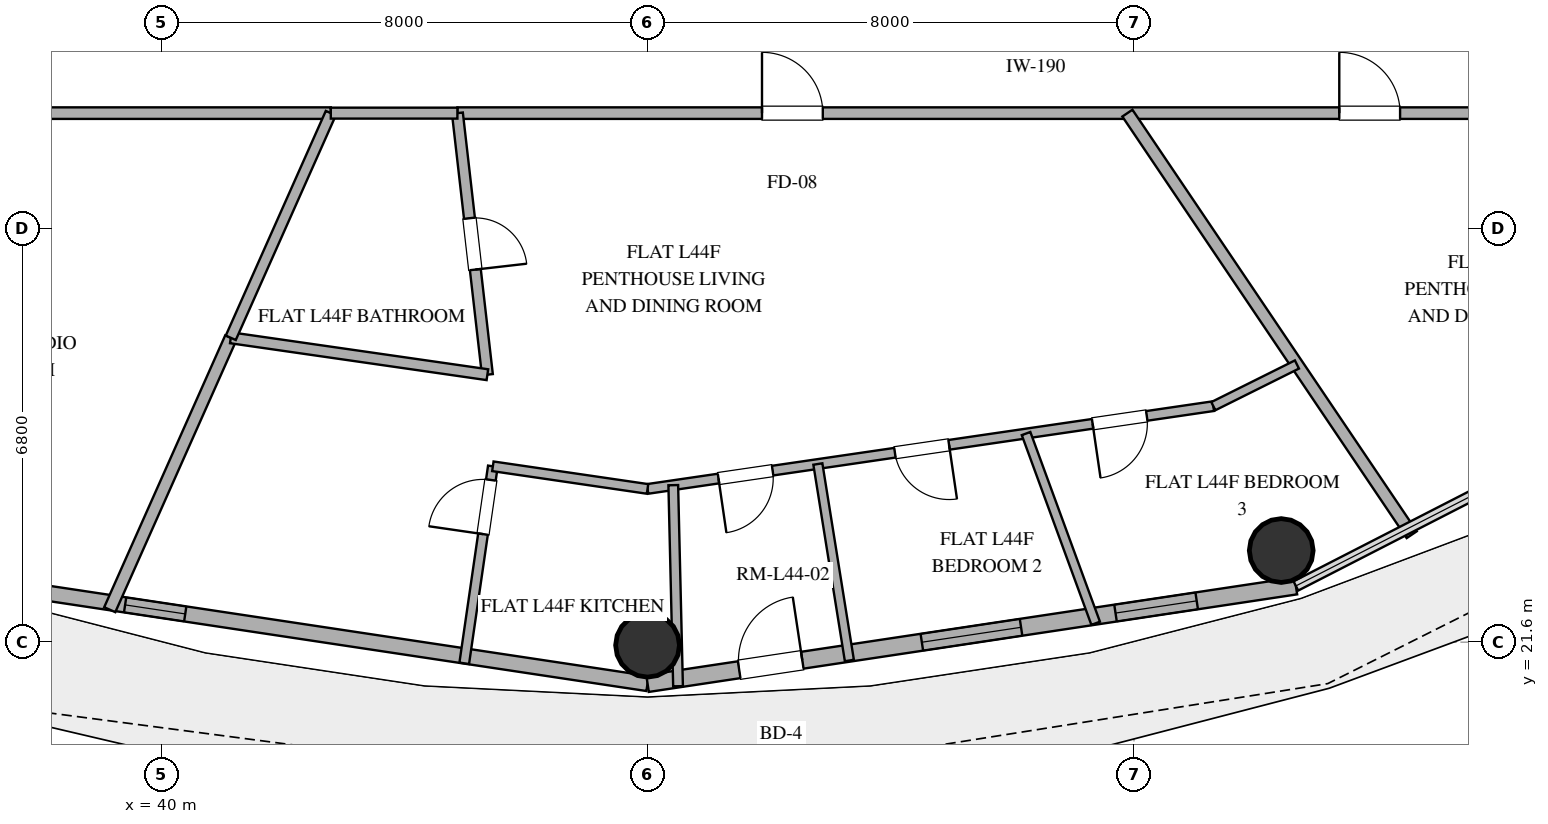
"""IFC4 building model, lengths in metres.
Left out: names, types, materials, properties, quantities, classifications, styles, units other than length and angle.
Written with IfcOpenShell. Run it as: python <this file> out.ifc"""

import sys

from ifc_helpers import new_model, si_unit, direction, frame, frame_2d, origin, origin_2d, place, context, subcontext, project, spatial, rectangle, hollow_circle, extrude, element, fill, save


model = new_model("IFC4")
c1 = context("Model", 3, precision=1e-05, world=origin(), true_north=direction((0.0, 1.0)))
c2 = subcontext(c1, "Body", "Model", "MODEL_VIEW")
j1 = project(units=[si_unit("LENGTHUNIT", "METRE"), si_unit("PLANEANGLEUNIT", "RADIAN")], contexts=[c1])
p1 = place(None, origin())
s1 = spatial("IfcSite", under=j1, at=p1, CompositionType="ELEMENT")
p2 = place(p1, origin())
s2 = spatial("IfcBuilding", under=s1, at=p2, CompositionType="ELEMENT")
p3 = place(p2, frame((0.0, 0.0, 175.8)))
s3 = spatial("IfcBuildingStorey", under=s2, at=p3, CompositionType="ELEMENT", Elevation=175.8)
for number, where, z_axis, x_axis in (
    (1, (48.0, 21.55, 0.0), (0.0, 0.0, 1.0), (1.0, 0.0, 0.0)),
    (2, (58.422, 23.107, 0.0), (0.0, 0.0, 1.0), (1.0, 0.0, 0.0)),
):
    element("IfcColumn", number, at=place(p3, frame(where, z_axis=z_axis, x_axis=x_axis)), inside=s3, PredefinedType="COLUMN", context=c2, shape_type="SweptSolid", body=[
        extrude(hollow_circle(Radius=0.525, WallThickness=0.028, at=origin_2d()), origin(), (0.0, 0.0, 1.0), 3.38),
    ])
p4 = place(p3, frame((37.337, 22.525, 0.0), z_axis=(0.0, 0.0, 1.0), x_axis=(0.988863993413, -0.148822049884, 0.0)))
e3 = element("IfcWall", 3, at=p4, inside=s3, PredefinedType="SOLIDWALL", context=c2, shape_type="SweptSolid", body=[
    extrude(rectangle(XDim=10.783, YDim=0.25, at=frame_2d((5.392, 0.0))), origin(), (0.0, 0.0, 1.0), 3.38),
])
p5 = place(p4, frame((2.094, 0.0, 1.42)))
e4 = element("IfcOpeningElement", 4, at=p5, cuts=e3, PredefinedType="OPENING", context=c2, shape_type="SweptSolid", body=[
    extrude(rectangle(XDim=1.0, YDim=1.05, at=frame_2d((0.5, 0.525))), frame((0.0, 0.135, 0.0), z_axis=(0.0, -1.0, 0.0), x_axis=(1.0, 0.0, 0.0)), (0.0, 0.0, 1.0), 0.27),
])
p6 = place(p3, frame((48.0, 20.92, 0.0), z_axis=(0.0, 0.0, 1.0), x_axis=(0.988863993413, 0.148822049884, 0.0)))
e5 = element("IfcWall", 5, at=p6, inside=s3, PredefinedType="SOLIDWALL", context=c2, shape_type="SweptSolid", body=[
    extrude(rectangle(XDim=10.783, YDim=0.28, at=frame_2d((5.392, 0.0))), origin(), (0.0, 0.0, 1.0), 3.38),
])
p7 = place(p6, frame((1.524, 0.0, 0.0)))
e6 = element("IfcOpeningElement", 6, at=p7, cuts=e5, PredefinedType="OPENING", context=c2, shape_type="SweptSolid", body=[
    extrude(rectangle(XDim=1.05, YDim=2.2, at=frame_2d((0.525, 1.1))), frame((0.0, 0.15, 0.0), z_axis=(0.0, -1.0, 0.0), x_axis=(1.0, 0.0, 0.0)), (0.0, 0.0, 1.0), 0.3),
])
p8 = place(p6, frame((4.562, 0.0, 0.85)))
e7 = element("IfcOpeningElement", 7, at=p8, cuts=e5, PredefinedType="OPENING", context=c2, shape_type="SweptSolid", body=[
    extrude(rectangle(XDim=1.65, YDim=2.0, at=frame_2d((0.825, 1.0))), frame((0.0, 0.15, 0.0), z_axis=(0.0, -1.0, 0.0), x_axis=(1.0, 0.0, 0.0)), (0.0, 0.0, 1.0), 0.3),
])
p9 = place(p6, frame((7.783, 0.0, 0.85)))
e8 = element("IfcOpeningElement", 8, at=p9, cuts=e5, PredefinedType="OPENING", context=c2, shape_type="SweptSolid", body=[
    extrude(rectangle(XDim=1.35, YDim=1.8, at=frame_2d((0.675, 0.9))), frame((0.0, 0.15, 0.0), z_axis=(0.0, -1.0, 0.0), x_axis=(1.0, 0.0, 0.0)), (0.0, 0.0, 1.0), 0.3),
])
p10 = place(p3, frame((44.873, 30.3, 0.0), z_axis=(0.0, 0.0, 1.0), x_axis=(1.0, 0.0, 0.0)))
e9 = element("IfcWall", 9, at=p10, inside=s3, PredefinedType="PARTITIONING", context=c2, shape_type="SweptSolid", body=[
    extrude(rectangle(XDim=19.027, YDim=0.19, at=frame_2d((9.514, 0.0))), origin(), (0.0, 0.0, 1.0), 2.74),
])
p11 = place(p10, frame((5.01, 0.0, 0.0)))
e10 = element("IfcOpeningElement", 10, at=p11, cuts=e9, PredefinedType="OPENING", context=c2, shape_type="SweptSolid", body=[
    extrude(rectangle(XDim=1.0, YDim=2.2, at=frame_2d((0.5, 1.1))), frame((0.0, 0.105, 0.0), z_axis=(0.0, -1.0, 0.0), x_axis=(1.0, 0.0, 0.0)), (0.0, 0.0, 1.0), 0.21),
])
p12 = place(p10, frame((14.504, 0.0, 0.0)))
e11 = element("IfcOpeningElement", 11, at=p12, cuts=e9, PredefinedType="OPENING", context=c2, shape_type="SweptSolid", body=[
    extrude(rectangle(XDim=1.0, YDim=2.2, at=frame_2d((0.5, 1.1))), frame((0.0, 0.105, 0.0), z_axis=(0.0, -1.0, 0.0), x_axis=(1.0, 0.0, 0.0)), (0.0, 0.0, 1.0), 0.21),
])
p13 = place(p3, frame((32.1, 30.3, 0.0), z_axis=(0.0, 0.0, 1.0), x_axis=(1.0, 0.0, 0.0)))
e12 = element("IfcWall", 12, at=p13, inside=s3, PredefinedType="PARTITIONING", context=c2, shape_type="SweptSolid", body=[
    extrude(rectangle(XDim=10.691, YDim=0.19, at=frame_2d((5.345, 0.0))), origin(), (0.0, 0.0, 1.0), 2.74),
])
p14 = place(p13, frame((4.845, 0.0, 0.0)))
e13 = element("IfcOpeningElement", 13, at=p14, cuts=e12, PredefinedType="OPENING", context=c2, shape_type="SweptSolid", body=[
    extrude(rectangle(XDim=1.0, YDim=2.2, at=frame_2d((0.5, 1.1))), frame((0.0, 0.105, 0.0), z_axis=(0.0, -1.0, 0.0), x_axis=(1.0, 0.0, 0.0)), (0.0, 0.0, 1.0), 0.21),
])
p15 = place(p3, frame((55.892, 30.3, 0.0), z_axis=(0.0, 0.0, 1.0), x_axis=(0.55918600376, -0.829042226427, 0.0)))
e14 = element("IfcWall", 14, at=p15, inside=s3, PredefinedType="PARTITIONING", context=c2, shape_type="SweptSolid", body=[
    extrude(rectangle(XDim=8.362, YDim=0.2, at=frame_2d((4.181, 0.0))), origin(), (0.0, 0.0, 1.0), 2.74),
])
p16 = place(p3, frame((39.155, 22.134, 0.0), z_axis=(0.0, 0.0, 1.0), x_axis=(0.406740050792, 0.913543940422, 0.0)))
e15 = element("IfcWall", 15, at=p16, inside=s3, PredefinedType="PARTITIONING", context=c2, shape_type="SweptSolid", body=[
    extrude(rectangle(XDim=4.894, YDim=0.2, at=frame_2d((2.447, 0.0))), origin(), (0.0, 0.0, 1.0), 2.74),
])
p17 = place(p3, frame((44.873, 30.3, 0.0), z_axis=(0.0, 0.0, 1.0), x_axis=(0.11390281129, -0.993491897088, 0.0)))
e16 = element("IfcWall", 16, at=p17, inside=s3, PredefinedType="PLUMBINGWALL", context=c2, shape_type="SweptSolid", body=[
    extrude(rectangle(XDim=4.33, YDim=0.18, at=frame_2d((2.165, 0.0))), origin(), (0.0, 0.0, 1.0), 2.74),
])
p18 = place(p17, frame((1.74, 0.0, 0.0)))
e17 = element("IfcOpeningElement", 17, at=p18, cuts=e16, PredefinedType="OPENING", context=c2, shape_type="SweptSolid", body=[
    extrude(rectangle(XDim=0.85, YDim=2.1, at=frame_2d((0.425, 1.05))), frame((0.0, 0.1, 0.0), z_axis=(0.0, -1.0, 0.0), x_axis=(1.0, 0.0, 0.0)), (0.0, 0.0, 1.0), 0.2),
])
p19 = place(p3, frame((45.366, 25.999, 0.0), z_axis=(0.0, 0.0, 1.0), x_axis=(-0.98982427769, 0.14229511339, 0.0)))
e18 = element("IfcWall", 18, at=p19, inside=s3, PredefinedType="PLUMBINGWALL", context=c2, shape_type="SweptSolid", body=[
    extrude(rectangle(XDim=4.264, YDim=0.18, at=frame_2d((2.132, 0.0))), origin(), (0.0, 0.0, 1.0), 2.74),
])
p20 = place(p3, frame((41.146, 26.605, 0.0), z_axis=(0.0, 0.0, 1.0), x_axis=(0.406732062562, 0.913547497005, 0.0)))
e19 = element("IfcWall", 19, at=p20, inside=s3, PredefinedType="PLUMBINGWALL", context=c2, shape_type="SweptSolid", body=[
    extrude(rectangle(XDim=4.044, YDim=0.18, at=frame_2d((2.022, 0.0))), origin(), (0.0, 0.0, 1.0), 2.74),
])
p21 = place(p3, frame((57.305, 25.481, 0.0), z_axis=(0.0, 0.0, 1.0), x_axis=(-0.989470950226, -0.144731609055, 0.0)))
e20 = element("IfcWall", 20, at=p21, inside=s3, PredefinedType="PLUMBINGWALL", context=c2, shape_type="SweptSolid", body=[
    extrude(rectangle(XDim=9.404, YDim=0.16, at=frame_2d((4.702, 0.0))), origin(), (0.0, 0.0, 1.0), 2.74),
])
p22 = place(p21, frame((4.393, 0.0, 0.0)))
e21 = element("IfcOpeningElement", 21, at=p22, cuts=e20, PredefinedType="OPENING", context=c2, shape_type="SweptSolid", body=[
    extrude(rectangle(XDim=0.9, YDim=2.1, at=frame_2d((0.45, 1.05))), frame((0.0, 0.09, 0.0), z_axis=(0.0, -1.0, 0.0), x_axis=(1.0, 0.0, 0.0)), (0.0, 0.0, 1.0), 0.18),
])
p23 = place(p21, frame((1.106, 0.0, 0.0)))
e22 = element("IfcOpeningElement", 22, at=p23, cuts=e20, PredefinedType="OPENING", context=c2, shape_type="SweptSolid", body=[
    extrude(rectangle(XDim=0.9, YDim=2.1, at=frame_2d((0.45, 1.05))), frame((0.0, 0.09, 0.0), z_axis=(0.0, -1.0, 0.0), x_axis=(1.0, 0.0, 0.0)), (0.0, 0.0, 1.0), 0.18),
])
p24 = place(p21, frame((7.325, 0.0, 0.0)))
e23 = element("IfcOpeningElement", 23, at=p24, cuts=e20, PredefinedType="OPENING", context=c2, shape_type="SweptSolid", body=[
    extrude(rectangle(XDim=0.9, YDim=2.1, at=frame_2d((0.45, 1.05))), frame((0.0, 0.09, 0.0), z_axis=(0.0, -1.0, 0.0), x_axis=(1.0, 0.0, 0.0)), (0.0, 0.0, 1.0), 0.18),
])
p25 = place(p3, frame((55.37, 21.91, 0.0), z_axis=(0.0, 0.0, 1.0), x_axis=(-0.344425148523, 0.938813781889, 0.0)))
e24 = element("IfcWall", 24, at=p25, inside=s3, PredefinedType="PARTITIONING", context=c2, shape_type="SweptSolid", body=[
    extrude(rectangle(XDim=3.324, YDim=0.15, at=frame_2d((1.662, 0.0))), origin(), (0.0, 0.0, 1.0), 2.74),
])
p26 = place(p3, frame((48.423, 24.182, 0.0), z_axis=(0.0, 0.0, 1.0), x_axis=(0.023765895275, -0.999717551222, 0.0)))
e25 = element("IfcWall", 25, at=p26, inside=s3, PredefinedType="PLUMBINGWALL", context=c2, shape_type="SweptSolid", body=[
    extrude(rectangle(XDim=3.308, YDim=0.16, at=frame_2d((1.654, 0.0))), origin(), (0.0, 0.0, 1.0), 2.74),
])
p27 = place(p3, frame((44.985, 21.252, 0.0), z_axis=(0.0, 0.0, 1.0), x_axis=(0.14376989574, 0.989611144379, 0.0)))
e26 = element("IfcWall", 26, at=p27, inside=s3, PredefinedType="PLUMBINGWALL", context=c2, shape_type="SweptSolid", body=[
    extrude(rectangle(XDim=3.274, YDim=0.16, at=frame_2d((1.637, 0.0))), origin(), (0.0, 0.0, 1.0), 2.74),
])
p28 = place(p27, frame((2.147, 0.0, 0.0)))
e27 = element("IfcOpeningElement", 27, at=p28, cuts=e26, PredefinedType="OPENING", context=c2, shape_type="SweptSolid", body=[
    extrude(rectangle(XDim=0.9, YDim=2.1, at=frame_2d((0.45, 1.05))), frame((0.0, 0.09, 0.0), z_axis=(0.0, -1.0, 0.0), x_axis=(1.0, 0.0, 0.0)), (0.0, 0.0, 1.0), 0.18),
])
p29 = place(p3, frame((51.319, 21.298, 0.0), z_axis=(0.0, 0.0, 1.0), x_axis=(-0.158287238469, 0.987393108209, 0.0)))
e28 = element("IfcWall", 28, at=p29, inside=s3, PredefinedType="PARTITIONING", context=c2, shape_type="SweptSolid", body=[
    extrude(rectangle(XDim=3.273, YDim=0.15, at=frame_2d((1.636, 0.0))), origin(), (0.0, 0.0, 1.0), 2.74),
])
p30 = place(p3, frame((45.456, 24.492, 0.0), z_axis=(0.0, 0.0, 1.0), x_axis=(0.989473006689, -0.144717549155, 0.0)))
e29 = element("IfcWall", 29, at=p30, inside=s3, PredefinedType="PLUMBINGWALL", context=c2, shape_type="SweptSolid", body=[
    extrude(rectangle(XDim=2.571, YDim=0.16, at=frame_2d((1.286, 0.0))), origin(), (0.0, 0.0, 1.0), 2.74),
])
p31 = place(p3, frame((42.791, 30.3, 0.0), z_axis=(0.0, 0.0, 1.0), x_axis=(1.0, 0.0, 0.0)))
e30 = element("IfcWall", 30, at=p31, inside=s3, PredefinedType="PLUMBINGWALL", context=c2, shape_type="SweptSolid", body=[
    extrude(rectangle(XDim=2.082, YDim=0.18, at=frame_2d((1.041, 0.0))), origin(), (0.0, 0.0, 1.0), 2.74),
])
p32 = place(p3, frame((57.305, 25.481, 0.0), z_axis=(0.0, 0.0, 1.0), x_axis=(0.89499854631, 0.446069055308, 0.0)))
e31 = element("IfcWall", 31, at=p32, inside=s3, PredefinedType="PARTITIONING", context=c2, shape_type="SweptSolid", body=[
    extrude(rectangle(XDim=1.536, YDim=0.15, at=frame_2d((0.768, 0.0))), origin(), (0.0, 0.0, 1.0), 2.74),
])
p33 = place(p7, origin())
e32 = element("IfcDoor", 32, at=p33, inside=s3, OperationType="SINGLE_SWING_RIGHT", PredefinedType="DOOR", context=c2, shape_type="SweptSolid", body=[
    extrude(rectangle(XDim=1.05, YDim=2.2, at=frame_2d((0.525, 1.1))), frame((0.0, 0.025, 0.0), z_axis=(0.0, -1.0, 0.0), x_axis=(1.0, 0.0, 0.0)), (0.0, 0.0, 1.0), 0.05),
])
fill(e6, e32)
p34 = place(p8, origin())
e33 = element("IfcWindow", 33, at=p34, inside=s3, PartitioningType="SINGLE_PANEL", PredefinedType="WINDOW", context=c2, shape_type="SweptSolid", body=[
    extrude(rectangle(XDim=1.65, YDim=2.0, at=frame_2d((0.825, 1.0))), frame((0.0, 0.03, 0.0), z_axis=(0.0, -1.0, 0.0), x_axis=(1.0, 0.0, 0.0)), (0.0, 0.0, 1.0), 0.06),
])
fill(e7, e33)
p35 = place(p9, origin())
e34 = element("IfcWindow", 34, at=p35, inside=s3, PartitioningType="SINGLE_PANEL", PredefinedType="WINDOW", context=c2, shape_type="SweptSolid", body=[
    extrude(rectangle(XDim=1.35, YDim=1.8, at=frame_2d((0.675, 0.9))), frame((0.0, 0.03, 0.0), z_axis=(0.0, -1.0, 0.0), x_axis=(1.0, 0.0, 0.0)), (0.0, 0.0, 1.0), 0.06),
])
fill(e8, e34)
p36 = place(p5, origin())
e35 = element("IfcWindow", 35, at=p36, inside=s3, PartitioningType="SINGLE_PANEL", PredefinedType="WINDOW", context=c2, shape_type="SweptSolid", body=[
    extrude(rectangle(XDim=1.0, YDim=1.05, at=frame_2d((0.5, 0.525))), frame((0.0, 0.03, 0.0), z_axis=(0.0, -1.0, 0.0), x_axis=(1.0, 0.0, 0.0)), (0.0, 0.0, 1.0), 0.06),
])
fill(e4, e35)
p37 = place(p11, origin())
e36 = element("IfcDoor", 36, at=p37, inside=s3, OperationType="SINGLE_SWING_LEFT", PredefinedType="DOOR", context=c2, shape_type="SweptSolid", body=[
    extrude(rectangle(XDim=1.0, YDim=2.2, at=frame_2d((0.5, 1.1))), frame((0.0, 0.025, 0.0), z_axis=(0.0, -1.0, 0.0), x_axis=(1.0, 0.0, 0.0)), (0.0, 0.0, 1.0), 0.05),
])
fill(e10, e36)
p38 = place(p12, origin())
e37 = element("IfcDoor", 37, at=p38, inside=s3, OperationType="SINGLE_SWING_LEFT", PredefinedType="DOOR", context=c2, shape_type="SweptSolid", body=[
    extrude(rectangle(XDim=1.0, YDim=2.2, at=frame_2d((0.5, 1.1))), frame((0.0, 0.025, 0.0), z_axis=(0.0, -1.0, 0.0), x_axis=(1.0, 0.0, 0.0)), (0.0, 0.0, 1.0), 0.05),
])
fill(e11, e37)
p39 = place(p18, origin())
e38 = element("IfcDoor", 38, at=p39, inside=s3, OperationType="SINGLE_SWING_RIGHT", PredefinedType="DOOR", context=c2, shape_type="SweptSolid", body=[
    extrude(rectangle(XDim=0.85, YDim=2.1, at=frame_2d((0.425, 1.05))), frame((0.0, 0.025, 0.0), z_axis=(0.0, -1.0, 0.0), x_axis=(1.0, 0.0, 0.0)), (0.0, 0.0, 1.0), 0.05),
])
fill(e17, e38)
p40 = place(p22, origin())
e39 = element("IfcDoor", 39, at=p40, inside=s3, OperationType="SINGLE_SWING_LEFT", PredefinedType="DOOR", context=c2, shape_type="SweptSolid", body=[
    extrude(rectangle(XDim=0.9, YDim=2.1, at=frame_2d((0.45, 1.05))), frame((0.0, 0.025, 0.0), z_axis=(0.0, -1.0, 0.0), x_axis=(1.0, 0.0, 0.0)), (0.0, 0.0, 1.0), 0.05),
])
fill(e21, e39)
p41 = place(p23, origin())
e40 = element("IfcDoor", 40, at=p41, inside=s3, OperationType="SINGLE_SWING_RIGHT", PredefinedType="DOOR", context=c2, shape_type="SweptSolid", body=[
    extrude(rectangle(XDim=0.9, YDim=2.1, at=frame_2d((0.45, 1.05))), frame((0.0, 0.025, 0.0), z_axis=(0.0, -1.0, 0.0), x_axis=(1.0, 0.0, 0.0)), (0.0, 0.0, 1.0), 0.05),
])
fill(e22, e40)
p42 = place(p24, origin())
e41 = element("IfcDoor", 41, at=p42, inside=s3, OperationType="SINGLE_SWING_RIGHT", PredefinedType="DOOR", context=c2, shape_type="SweptSolid", body=[
    extrude(rectangle(XDim=0.9, YDim=2.1, at=frame_2d((0.45, 1.05))), frame((0.0, 0.025, 0.0), z_axis=(0.0, -1.0, 0.0), x_axis=(1.0, 0.0, 0.0)), (0.0, 0.0, 1.0), 0.05),
])
fill(e23, e41)
p43 = place(p28, origin())
e42 = element("IfcDoor", 42, at=p43, inside=s3, OperationType="SINGLE_SWING_LEFT", PredefinedType="DOOR", context=c2, shape_type="SweptSolid", body=[
    extrude(rectangle(XDim=0.9, YDim=2.1, at=frame_2d((0.45, 1.05))), frame((0.0, 0.025, 0.0), z_axis=(0.0, -1.0, 0.0), x_axis=(1.0, 0.0, 0.0)), (0.0, 0.0, 1.0), 0.05),
])
fill(e27, e42)
save(model, sys.argv[1])
